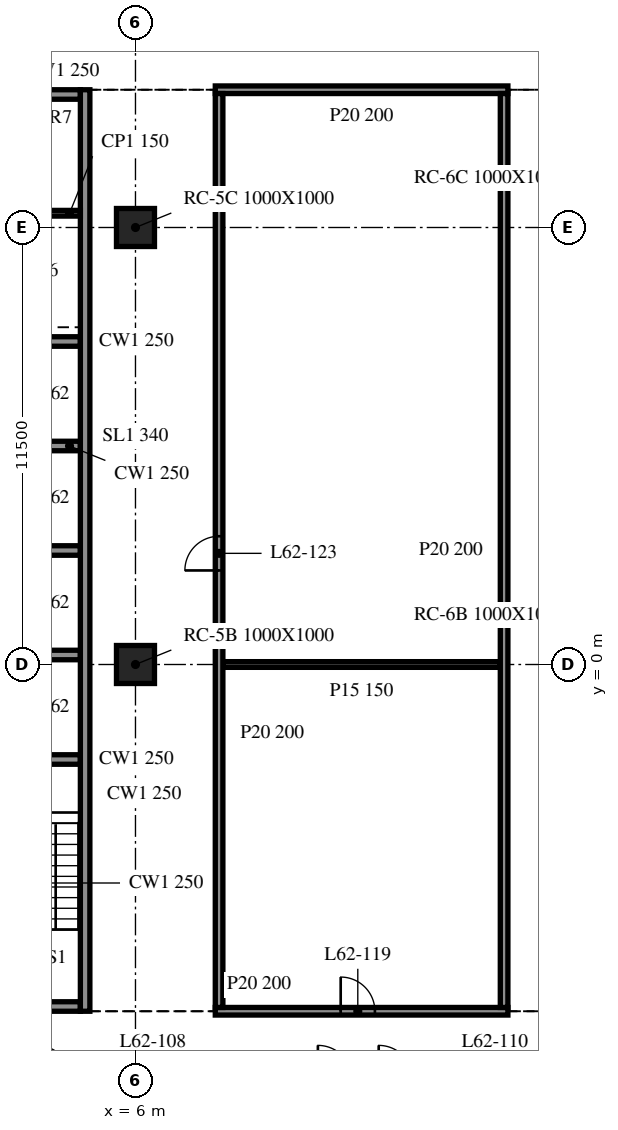
"""IFC4 building model, lengths in metres.
Left out: names, types, materials, properties, quantities, classifications, styles, units other than length and angle.
Written with IfcOpenShell. Run it as: python <this file> out.ifc"""

import sys

from ifc_helpers import new_model, si_unit, direction, frame, frame_2d, origin, origin_2d, place, context, subcontext, project, spatial, rectangle, extrude, element, fill, save


model = new_model("IFC4")
c1 = context("Model", 3, precision=1e-05, world=origin(), true_north=direction((0.0, 1.0)))
c2 = subcontext(c1, "Body", "Model", "MODEL_VIEW")
j1 = project(units=[si_unit("LENGTHUNIT", "METRE"), si_unit("PLANEANGLEUNIT", "RADIAN")], contexts=[c1])
p1 = place(None, origin())
s1 = spatial("IfcSite", under=j1, at=p1, CompositionType="ELEMENT")
p2 = place(p1, origin())
s2 = spatial("IfcBuilding", under=s1, at=p2, CompositionType="ELEMENT")
p3 = place(p2, frame((0.0, 0.0, 255.2)))
s3 = spatial("IfcBuildingStorey", under=s2, at=p3, CompositionType="ELEMENT", Elevation=255.2)
for number, where, z_axis, x_axis in (
    (1, (6.0, 0.0, -0.34), (0.0, 0.0, 1.0), (1.0, 0.0, 0.0)),
    (2, (6.0, 11.5, -0.34), (0.0, 0.0, 1.0), (1.0, 0.0, 0.0)),
):
    element("IfcColumn", number, at=place(p3, frame(where, z_axis=z_axis, x_axis=x_axis)), inside=s3, PredefinedType="COLUMN", context=c2, shape_type="SweptSolid", body=[
        extrude(rectangle(XDim=1.0, YDim=1.0, at=origin_2d()), origin(), (0.0, 0.0, 1.0), 3.74),
    ])
p4 = place(p3, frame((4.675, -9.125, 0.0), z_axis=(0.0, 0.0, 1.0), x_axis=(0.0, 1.0, 0.0)))
e3 = element("IfcWall", 3, at=p4, inside=s3, PredefinedType="SOLIDWALL", context=c2, shape_type="SweptSolid", body=[
    extrude(rectangle(XDim=24.25, YDim=0.25, at=frame_2d((12.125, 0.0))), origin(), (0.0, 0.0, 1.0), 3.4),
])
p5 = place(p3, frame((4.55, -9.0, 0.0), z_axis=(0.0, 0.0, 1.0), x_axis=(-1.0, 0.0, 0.0)))
e4 = element("IfcWall", 4, at=p5, inside=s3, PredefinedType="SOLIDWALL", context=c2, shape_type="SweptSolid", body=[
    extrude(rectangle(XDim=9.1, YDim=0.25, at=frame_2d((4.55, 0.0))), origin(), (0.0, 0.0, 1.0), 3.4),
])
p6 = place(p5, frame((3.65, 0.0, 0.0)))
e5 = element("IfcOpeningElement", 5, at=p6, cuts=e4, PredefinedType="OPENING", context=c2, shape_type="SweptSolid", body=[
    extrude(rectangle(XDim=1.8, YDim=2.1, at=frame_2d((0.9, 1.05))), frame((0.0, 0.135, 0.0), z_axis=(0.0, -1.0, 0.0), x_axis=(1.0, 0.0, 0.0)), (0.0, 0.0, 1.0), 0.27),
])
p7 = place(p3, frame((-4.55, 15.0, 0.0), z_axis=(0.0, 0.0, 1.0), x_axis=(1.0, 0.0, 0.0)))
e6 = element("IfcWall", 6, at=p7, inside=s3, PredefinedType="SOLIDWALL", context=c2, shape_type="SweptSolid", body=[
    extrude(rectangle(XDim=9.1, YDim=0.25, at=frame_2d((4.55, 0.0))), origin(), (0.0, 0.0, 1.0), 3.4),
])
p8 = place(p7, frame((3.65, 0.0, 0.0)))
e7 = element("IfcOpeningElement", 7, at=p8, cuts=e6, PredefinedType="OPENING", context=c2, shape_type="SweptSolid", body=[
    extrude(rectangle(XDim=1.8, YDim=2.1, at=frame_2d((0.9, 1.05))), frame((0.0, 0.135, 0.0), z_axis=(0.0, -1.0, 0.0), x_axis=(1.0, 0.0, 0.0)), (0.0, 0.0, 1.0), 0.27),
])
for number, where, z_axis, x_axis in (
    (8, (1.7, -2.5, 0.0), (0.0, 0.0, 1.0), (1.0, 0.0, 0.0)),
    (9, (1.7, 0.25, 0.0), (0.0, 0.0, 1.0), (1.0, 0.0, 0.0)),
    (10, (1.7, 3.0, 0.0), (0.0, 0.0, 1.0), (1.0, 0.0, 0.0)),
    (11, (1.7, 5.75, 0.0), (0.0, 0.0, 1.0), (1.0, 0.0, 0.0)),
    (12, (1.7, 8.5, 0.0), (0.0, 0.0, 1.0), (1.0, 0.0, 0.0)),
):
    element("IfcWall", number, at=place(p3, frame(where, z_axis=z_axis, x_axis=x_axis)), inside=s3, PredefinedType="SOLIDWALL", context=c2, shape_type="SweptSolid", body=[
        extrude(rectangle(XDim=2.85, YDim=0.25, at=frame_2d((1.425, 0.0))), origin(), (0.0, 0.0, 1.0), 3.4),
    ])
p9 = place(p3, frame((1.7, 11.875, 0.0), z_axis=(0.0, 0.0, 1.0), x_axis=(1.0, 0.0, 0.0)))
e13 = element("IfcWall", 13, at=p9, inside=s3, PredefinedType="PARTITIONING", context=c2, shape_type="SweptSolid", body=[
    extrude(rectangle(XDim=2.85, YDim=0.15, at=frame_2d((1.425, 0.0))), origin(), (0.0, 0.0, 1.0), 3.4),
])
p10 = place(p3, frame((8.1, -9.125, 0.0), z_axis=(0.0, 0.0, 1.0), x_axis=(1.0, 0.0, 0.0)))
e14 = element("IfcWall", 14, at=p10, inside=s3, PredefinedType="PARTITIONING", context=c2, shape_type="SweptSolid", body=[
    extrude(rectangle(XDim=7.7, YDim=0.2, at=frame_2d((3.85, 0.0))), origin(), (0.0, 0.0, 1.0), 3.4),
])
p11 = place(p10, frame((3.3, 0.0, 0.0)))
e15 = element("IfcOpeningElement", 15, at=p11, cuts=e14, PredefinedType="OPENING", context=c2, shape_type="SweptSolid", body=[
    extrude(rectangle(XDim=0.9, YDim=2.1, at=frame_2d((0.45, 1.05))), frame((0.0, 0.11, 0.0), z_axis=(0.0, -1.0, 0.0), x_axis=(1.0, 0.0, 0.0)), (0.0, 0.0, 1.0), 0.22),
])
p12 = place(p3, frame((8.3, 0.0, 0.0), z_axis=(0.0, 0.0, 1.0), x_axis=(1.0, 0.0, 0.0)))
e16 = element("IfcWall", 16, at=p12, inside=s3, PredefinedType="PARTITIONING", context=c2, shape_type="SweptSolid", body=[
    extrude(rectangle(XDim=7.3, YDim=0.15, at=frame_2d((3.65, 0.0))), origin(), (0.0, 0.0, 1.0), 3.4),
])
p13 = place(p3, frame((8.1, 15.125, 0.0), z_axis=(0.0, 0.0, 1.0), x_axis=(1.0, 0.0, 0.0)))
e17 = element("IfcWall", 17, at=p13, inside=s3, PredefinedType="PARTITIONING", context=c2, shape_type="SweptSolid", body=[
    extrude(rectangle(XDim=7.7, YDim=0.2, at=frame_2d((3.85, 0.0))), origin(), (0.0, 0.0, 1.0), 3.4),
])
p14 = place(p3, frame((8.2, -9.025, 0.0), z_axis=(0.0, 0.0, 1.0), x_axis=(0.0, 1.0, 0.0)))
e18 = element("IfcWall", 18, at=p14, inside=s3, PredefinedType="PARTITIONING", context=c2, shape_type="SweptSolid", body=[
    extrude(rectangle(XDim=24.05, YDim=0.2, at=frame_2d((12.025, 0.0))), origin(), (0.0, 0.0, 1.0), 3.4),
])
p15 = place(p14, frame((11.5, 0.0, 0.0)))
e19 = element("IfcOpeningElement", 19, at=p15, cuts=e18, PredefinedType="OPENING", context=c2, shape_type="SweptSolid", body=[
    extrude(rectangle(XDim=0.9, YDim=2.1, at=frame_2d((0.45, 1.05))), frame((0.0, 0.11, 0.0), z_axis=(0.0, -1.0, 0.0), x_axis=(1.0, 0.0, 0.0)), (0.0, 0.0, 1.0), 0.22),
])
p16 = place(p3, frame((15.7, -9.025, 0.0), z_axis=(0.0, 0.0, 1.0), x_axis=(0.0, 1.0, 0.0)))
e20 = element("IfcWall", 20, at=p16, inside=s3, PredefinedType="PARTITIONING", context=c2, shape_type="SweptSolid", body=[
    extrude(rectangle(XDim=24.05, YDim=0.2, at=frame_2d((12.025, 0.0))), origin(), (0.0, 0.0, 1.0), 3.4),
])
p17 = place(p11, origin())
e21 = element("IfcDoor", 21, at=p17, inside=s3, OperationType="SINGLE_SWING_LEFT", PredefinedType="DOOR", context=c2, shape_type="SweptSolid", body=[
    extrude(rectangle(XDim=0.9, YDim=2.1, at=frame_2d((0.45, 1.05))), frame((0.0, 0.025, 0.0), z_axis=(0.0, -1.0, 0.0), x_axis=(1.0, 0.0, 0.0)), (0.0, 0.0, 1.0), 0.05),
])
fill(e15, e21)
p18 = place(p15, origin())
e22 = element("IfcDoor", 22, at=p18, inside=s3, OperationType="SINGLE_SWING_RIGHT", PredefinedType="DOOR", context=c2, shape_type="SweptSolid", body=[
    extrude(rectangle(XDim=0.9, YDim=2.1, at=frame_2d((0.45, 1.05))), frame((0.0, 0.025, 0.0), z_axis=(0.0, -1.0, 0.0), x_axis=(1.0, 0.0, 0.0)), (0.0, 0.0, 1.0), 0.05),
])
fill(e19, e22)
save(model, sys.argv[1])
